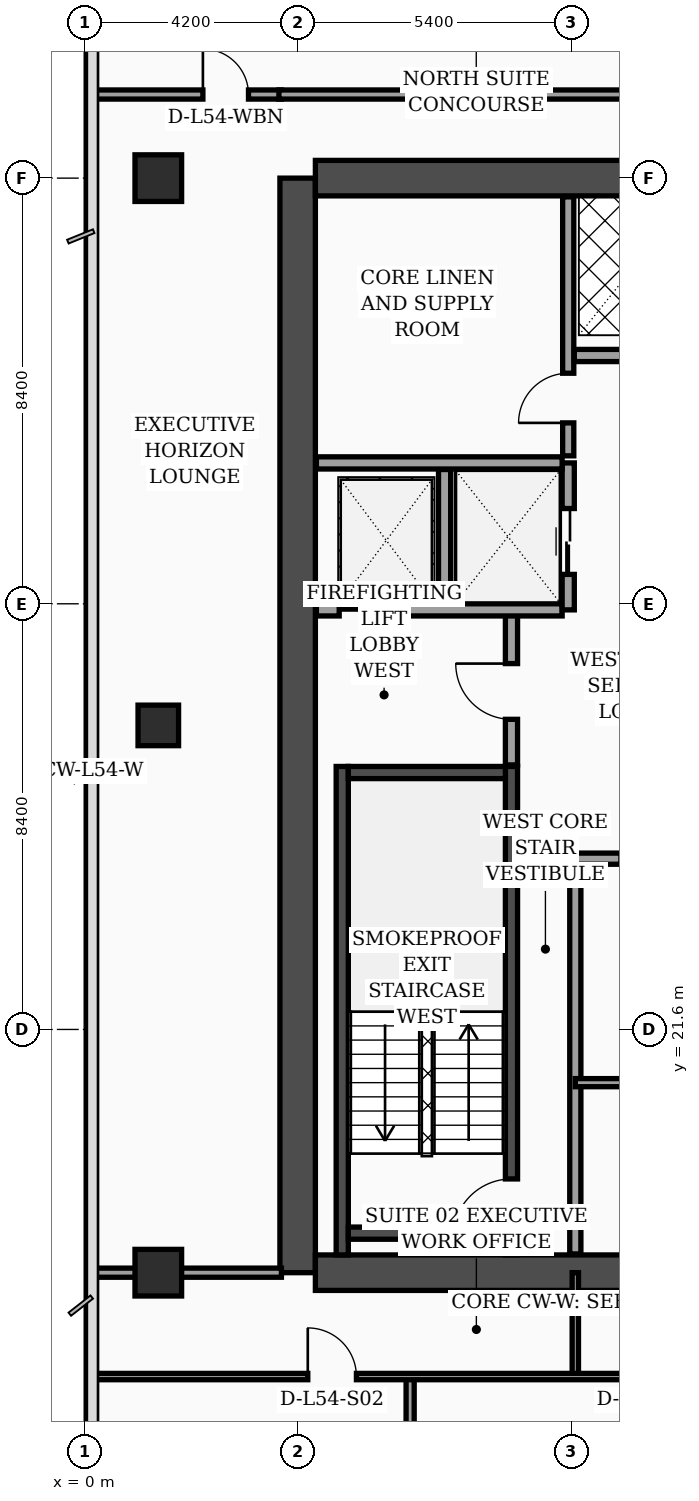
"""IFC4 building model, lengths in metres.
Left out: names, types, materials, properties, quantities, classifications, styles, units other than length and angle.
Written with IfcOpenShell. Run it as: python <this file> out.ifc"""

import sys

from ifc_helpers import new_model, si_unit, direction, frame, frame_2d, origin, origin_2d, place, context, subcontext, project, spatial, rectangle, extrude, element, fill, save


model = new_model("IFC4")
c1 = context("Model", 3, precision=1e-05, world=origin(), true_north=direction((0.0, 1.0)))
c2 = subcontext(c1, "Body", "Model", "MODEL_VIEW")
j1 = project(units=[si_unit("LENGTHUNIT", "METRE"), si_unit("PLANEANGLEUNIT", "RADIAN")], contexts=[c1])
p1 = place(None, origin())
s1 = spatial("IfcSite", under=j1, at=p1, CompositionType="ELEMENT")
p2 = place(p1, origin())
s2 = spatial("IfcBuilding", under=s1, at=p2, CompositionType="ELEMENT")
p3 = place(p2, frame((0.0, 0.0, 219.3)))
s3 = spatial("IfcBuildingStorey", under=s2, at=p3, CompositionType="ELEMENT", Elevation=219.3)
p4 = place(p3, frame((4.2, 16.8, 0.0), z_axis=(0.0, 0.0, 1.0), x_axis=(0.0, 1.0, 0.0)))
e1 = element("IfcWall", 1, at=p4, inside=s3, PredefinedType="SHEAR", context=c2, shape_type="SweptSolid", body=[
    extrude(rectangle(XDim=21.6, YDim=0.7, at=frame_2d((10.8, 0.0))), origin(), (0.0, 0.0, 1.0), 3.56),
])
for number, where, z_axis, x_axis in (
    (2, (4.55, 38.4, 0.0), (0.0, 0.0, 1.0), (1.0, 0.0, 0.0)),
    (3, (4.55, 16.8, 0.0), (0.0, 0.0, 1.0), (1.0, 0.0, 0.0)),
):
    element("IfcWall", number, at=place(p3, frame(where, z_axis=z_axis, x_axis=x_axis)), inside=s3, PredefinedType="SHEAR", context=c2, shape_type="SweptSolid", body=[
        extrude(rectangle(XDim=10.1, YDim=0.7, at=frame_2d((5.05, 0.0))), origin(), (0.0, 0.0, 1.0), 3.56),
    ])
p5 = place(p3, frame((5.08, 17.15, 0.0), z_axis=(0.0, 0.0, 1.0), x_axis=(0.0, 1.0, 0.0)))
e4 = element("IfcWall", 4, at=p5, inside=s3, PredefinedType="SOLIDWALL", context=c2, shape_type="SweptSolid", body=[
    extrude(rectangle(XDim=9.64, YDim=0.24, at=frame_2d((4.82, 0.0))), origin(), (0.0, 0.0, 1.0), 3.56),
])
p6 = place(p3, frame((8.42, 17.15, 0.0), z_axis=(0.0, 0.0, 1.0), x_axis=(0.0, 1.0, 0.0)))
e5 = element("IfcWall", 5, at=p6, inside=s3, PredefinedType="SOLIDWALL", context=c2, shape_type="SweptSolid", body=[
    extrude(rectangle(XDim=9.64, YDim=0.24, at=frame_2d((4.82, 0.0))), origin(), (0.0, 0.0, 1.0), 3.56),
])
p7 = place(p6, frame((0.35, 0.0, 0.0)))
e6 = element("IfcOpeningElement", 6, at=p7, cuts=e5, PredefinedType="OPENING", context=c2, shape_type="SweptSolid", body=[
    extrude(rectangle(XDim=1.15, YDim=2.2, at=frame_2d((0.575, 1.1))), frame((0.0, 0.13, 0.0), z_axis=(0.0, -1.0, 0.0), x_axis=(1.0, 0.0, 0.0)), (0.0, 0.0, 1.0), 0.26),
])
for number, where, z_axis, x_axis in (
    (7, (5.2, 17.58, 0.0), (0.0, 0.0, 1.0), (1.0, 0.0, 0.0)),
    (8, (5.2, 26.67, 0.0), (0.0, 0.0, 1.0), (1.0, 0.0, 0.0)),
):
    element("IfcWall", number, at=place(p3, frame(where, z_axis=z_axis, x_axis=x_axis)), inside=s3, PredefinedType="SOLIDWALL", context=c2, shape_type="SweptSolid", body=[
        extrude(rectangle(XDim=3.1, YDim=0.24, at=frame_2d((1.55, 0.0))), origin(), (0.0, 0.0, 1.0), 3.56),
    ])
p8 = place(p3, frame((1.45, 16.8, 0.0), z_axis=(0.0, 0.0, 1.0), x_axis=(1.0, 0.0, 0.0)))
e9 = element("IfcColumn", 9, at=p8, inside=s3, PredefinedType="COLUMN", context=c2, shape_type="SweptSolid", body=[
    extrude(rectangle(XDim=0.92, YDim=0.92, at=origin_2d()), origin(), (0.0, 0.0, 1.0), 3.56),
])
p9 = place(p3, frame((1.45, 27.6, 0.0), z_axis=(0.0, 0.0, 1.0), x_axis=(1.0, 0.0, 0.0)))
e10 = element("IfcColumn", 10, at=p9, inside=s3, PredefinedType="COLUMN", context=c2, shape_type="SweptSolid", body=[
    extrude(rectangle(XDim=0.8, YDim=0.8, at=origin_2d()), origin(), (0.0, 0.0, 1.0), 3.56),
])
p10 = place(p3, frame((1.45, 38.4, 0.0), z_axis=(0.0, 0.0, 1.0), x_axis=(1.0, 0.0, 0.0)))
e11 = element("IfcColumn", 11, at=p10, inside=s3, PredefinedType="COLUMN", context=c2, shape_type="SweptSolid", body=[
    extrude(rectangle(XDim=0.92, YDim=0.92, at=origin_2d()), origin(), (0.0, 0.0, 1.0), 3.56),
])
p11 = place(p3, frame((8.42, 26.82, 0.0), z_axis=(0.0, 0.0, 1.0), x_axis=(0.0, 1.0, 0.0)))
e12 = element("IfcWall", 12, at=p11, inside=s3, PredefinedType="SOLIDWALL", context=c2, shape_type="SweptSolid", body=[
    extrude(rectangle(XDim=3.0, YDim=0.24, at=frame_2d((1.5, 0.0))), origin(), (0.0, 0.0, 1.0), 3.56),
])
p12 = place(p11, frame((0.9, 0.0, 0.0)))
e13 = element("IfcOpeningElement", 13, at=p12, cuts=e12, PredefinedType="OPENING", context=c2, shape_type="SweptSolid", body=[
    extrude(rectangle(XDim=1.1, YDim=2.2, at=frame_2d((0.55, 1.1))), frame((0.0, 0.13, 0.0), z_axis=(0.0, -1.0, 0.0), x_axis=(1.0, 0.0, 0.0)), (0.0, 0.0, 1.0), 0.26),
])
p13 = place(p3, frame((4.57, 29.88, 0.0), z_axis=(0.0, 0.0, 1.0), x_axis=(1.0, 0.0, 0.0)))
e14 = element("IfcWall", 14, at=p13, inside=s3, PredefinedType="SOLIDWALL", context=c2, shape_type="SweptSolid", body=[
    extrude(rectangle(XDim=4.85, YDim=0.24, at=frame_2d((2.425, 0.0))), origin(), (0.0, 0.0, 1.0), 3.56),
])
p14 = place(p13, frame((0.45, 0.0, 0.0)))
e15 = element("IfcOpeningElement", 15, at=p14, cuts=e14, PredefinedType="OPENING", context=c2, shape_type="SweptSolid", body=[
    extrude(rectangle(XDim=1.3, YDim=2.35, at=frame_2d((0.65, 1.175))), frame((0.0, 0.13, 0.0), z_axis=(0.0, -1.0, 0.0), x_axis=(1.0, 0.0, 0.0)), (0.0, 0.0, 1.0), 0.26),
])
p15 = place(p3, frame((7.1, 30.02, 0.0), z_axis=(0.0, 0.0, 1.0), x_axis=(0.0, 1.0, 0.0)))
e16 = element("IfcWall", 16, at=p15, inside=s3, PredefinedType="SOLIDWALL", context=c2, shape_type="SweptSolid", body=[
    extrude(rectangle(XDim=2.63, YDim=0.24, at=frame_2d((1.315, 0.0))), origin(), (0.0, 0.0, 1.0), 3.56),
])
p16 = place(p3, frame((9.54, 29.88, 0.0), z_axis=(0.0, 0.0, 1.0), x_axis=(0.0, 1.0, 0.0)))
e17 = element("IfcWall", 17, at=p16, inside=s3, PredefinedType="SOLIDWALL", context=c2, shape_type="SweptSolid", body=[
    extrude(rectangle(XDim=2.9, YDim=0.24, at=frame_2d((1.45, 0.0))), origin(), (0.0, 0.0, 1.0), 3.56),
])
p17 = place(p16, frame((0.7, 0.0, 0.0)))
e18 = element("IfcOpeningElement", 18, at=p17, cuts=e17, PredefinedType="OPENING", context=c2, shape_type="SweptSolid", body=[
    extrude(rectangle(XDim=1.3, YDim=2.35, at=frame_2d((0.65, 1.175))), frame((0.0, 0.13, 0.0), z_axis=(0.0, -1.0, 0.0), x_axis=(1.0, 0.0, 0.0)), (0.0, 0.0, 1.0), 0.26),
])
p18 = place(p3, frame((4.57, 32.78, 0.0), z_axis=(0.0, 0.0, 1.0), x_axis=(1.0, 0.0, 0.0)))
e19 = element("IfcWall", 19, at=p18, inside=s3, PredefinedType="SOLIDWALL", context=c2, shape_type="SweptSolid", body=[
    extrude(rectangle(XDim=4.85, YDim=0.24, at=frame_2d((2.425, 0.0))), origin(), (0.0, 0.0, 1.0), 3.19),
])
p19 = place(p3, frame((9.68, 17.17, 0.0), z_axis=(0.0, 0.0, 1.0), x_axis=(0.0, 1.0, 0.0)))
e20 = element("IfcWall", 20, at=p19, inside=s3, PredefinedType="SOLIDWALL", context=c2, shape_type="SweptSolid", body=[
    extrude(rectangle(XDim=7.83, YDim=0.22, at=frame_2d((3.915, 0.0))), origin(), (0.0, 0.0, 1.0), 3.56),
])
p20 = place(p3, frame((9.54, 32.92, 0.0), z_axis=(0.0, 0.0, 1.0), x_axis=(0.0, 1.0, 0.0)))
e21 = element("IfcWall", 21, at=p20, inside=s3, PredefinedType="SOLIDWALL", context=c2, shape_type="SweptSolid", body=[
    extrude(rectangle(XDim=5.11, YDim=0.22, at=frame_2d((2.555, 0.0))), origin(), (0.0, 0.0, 1.0), 3.56),
])
p21 = place(p20, frame((0.65, 0.0, 0.0)))
e22 = element("IfcOpeningElement", 22, at=p21, cuts=e21, PredefinedType="OPENING", context=c2, shape_type="SweptSolid", body=[
    extrude(rectangle(XDim=0.98, YDim=2.15, at=frame_2d((0.49, 1.075))), frame((0.0, 0.12, 0.0), z_axis=(0.0, -1.0, 0.0), x_axis=(1.0, 0.0, 0.0)), (0.0, 0.0, 1.0), 0.24),
])
p22 = place(p3, frame((9.68, 20.55, 0.0), z_axis=(0.0, 0.0, 1.0), x_axis=(1.0, 0.0, 0.0)))
e23 = element("IfcWall", 23, at=p22, inside=s3, PredefinedType="PARTITIONING", context=c2, shape_type="SweptSolid", body=[
    extrude(rectangle(XDim=4.95, YDim=0.16, at=frame_2d((2.475, 0.0))), origin(), (0.0, 0.0, 1.0), 3.56),
])
p23 = place(p22, frame((1.1, 0.0, 0.0)))
e24 = element("IfcOpeningElement", 24, at=p23, cuts=e23, PredefinedType="OPENING", context=c2, shape_type="SweptSolid", body=[
    extrude(rectangle(XDim=0.98, YDim=2.15, at=frame_2d((0.49, 1.075))), frame((0.0, 0.09, 0.0), z_axis=(0.0, -1.0, 0.0), x_axis=(1.0, 0.0, 0.0)), (0.0, 0.0, 1.0), 0.18),
])
p24 = place(p3, frame((9.68, 24.97, 0.0), z_axis=(0.0, 0.0, 1.0), x_axis=(1.0, 0.0, 0.0)))
e25 = element("IfcWall", 25, at=p24, inside=s3, PredefinedType="SOLIDWALL", context=c2, shape_type="SweptSolid", body=[
    extrude(rectangle(XDim=4.95, YDim=0.22, at=frame_2d((2.475, 0.0))), origin(), (0.0, 0.0, 1.0), 2.94),
])
p25 = place(p24, frame((0.9, 0.0, 0.0)))
e26 = element("IfcOpeningElement", 26, at=p25, cuts=e25, PredefinedType="OPENING", context=c2, shape_type="SweptSolid", body=[
    extrude(rectangle(XDim=0.98, YDim=2.15, at=frame_2d((0.49, 1.075))), frame((0.0, 0.12, 0.0), z_axis=(0.0, -1.0, 0.0), x_axis=(1.0, 0.0, 0.0)), (0.0, 0.0, 1.0), 0.24),
])
p26 = place(p3, frame((9.66, 34.9, 0.0), z_axis=(0.0, 0.0, 1.0), x_axis=(1.0, 0.0, 0.0)))
e27 = element("IfcWall", 27, at=p26, inside=s3, PredefinedType="SOLIDWALL", context=c2, shape_type="SweptSolid", body=[
    extrude(rectangle(XDim=4.97, YDim=0.24, at=frame_2d((2.485, 0.0))), origin(), (0.0, 0.0, 1.0), 3.56),
])
p27 = place(p3, frame((0.08, 16.8, 0.0), z_axis=(0.0, 0.0, 1.0), x_axis=(1.0, 0.0, 0.0)))
e28 = element("IfcWall", 28, at=p27, inside=s3, PredefinedType="PARTITIONING", context=c2, shape_type="SweptSolid", body=[
    extrude(rectangle(XDim=3.8, YDim=0.18, at=frame_2d((1.9, 0.0))), origin(), (0.0, 0.0, 1.0), 2.94),
])
p28 = place(p3, frame((0.08, 40.05, 0.0), z_axis=(0.0, 0.0, 1.0), x_axis=(1.0, 0.0, 0.0)))
e29 = element("IfcWall", 29, at=p28, inside=s3, PredefinedType="PARTITIONING", context=c2, shape_type="SweptSolid", body=[
    extrude(rectangle(XDim=3.8, YDim=0.18, at=frame_2d((1.9, 0.0))), origin(), (0.0, 0.0, 1.0), 2.94),
])
p29 = place(p28, frame((2.25, 0.0, 0.0)))
e30 = element("IfcOpeningElement", 30, at=p29, cuts=e29, PredefinedType="OPENING", context=c2, shape_type="SweptSolid", body=[
    extrude(rectangle(XDim=0.9, YDim=2.15, at=frame_2d((0.45, 1.075))), frame((0.0, 0.1, 0.0), z_axis=(0.0, -1.0, 0.0), x_axis=(1.0, 0.0, 0.0)), (0.0, 0.0, 1.0), 0.2),
])
p30 = place(p3, frame((9.68, 14.75, 0.0), z_axis=(0.0, 0.0, 1.0), x_axis=(0.0, 1.0, 0.0)))
e31 = element("IfcWall", 31, at=p30, inside=s3, PredefinedType="PARTITIONING", context=c2, shape_type="SweptSolid", body=[
    extrude(rectangle(XDim=2.05, YDim=0.125, at=frame_2d((1.025, 0.0))), origin(), (0.0, 0.0, 1.0), 3.56),
])
p31 = place(p3, frame((6.42, 9.5, 0.0), z_axis=(0.0, 0.0, 1.0), x_axis=(0.0, 1.0, 0.0)))
e32 = element("IfcWall", 32, at=p31, inside=s3, PredefinedType="PARTITIONING", context=c2, shape_type="SweptSolid", body=[
    extrude(rectangle(XDim=5.25, YDim=0.16, at=frame_2d((2.625, 0.0))), origin(), (0.0, 0.0, 1.0), 3.14),
])
p32 = place(p31, frame((2.15, 0.0, 0.0)))
e33 = element("IfcOpeningElement", 33, at=p32, cuts=e32, PredefinedType="OPENING", context=c2, shape_type="SweptSolid", body=[
    extrude(rectangle(XDim=0.96, YDim=2.2, at=frame_2d((0.48, 1.1))), frame((0.0, 0.09, 0.0), z_axis=(0.0, -1.0, 0.0), x_axis=(1.0, 0.0, 0.0)), (0.0, 0.0, 1.0), 0.18),
])
p33 = place(p3, frame((0.08, 14.75, 0.0), z_axis=(0.0, 0.0, 1.0), x_axis=(1.0, 0.0, 0.0)))
e34 = element("IfcWall", 34, at=p33, inside=s3, PredefinedType="PARTITIONING", context=c2, shape_type="SweptSolid", body=[
    extrude(rectangle(XDim=12.52, YDim=0.125, at=frame_2d((6.26, 0.0))), origin(), (0.0, 0.0, 1.0), 2.94),
])
p34 = place(p33, frame((4.32, 0.0, 0.0)))
e35 = element("IfcOpeningElement", 35, at=p34, cuts=e34, PredefinedType="OPENING", context=c2, shape_type="SweptSolid", body=[
    extrude(rectangle(XDim=0.96, YDim=2.2, at=frame_2d((0.48, 1.1))), frame((0.0, 0.073, 0.0), z_axis=(0.0, -1.0, 0.0), x_axis=(1.0, 0.0, 0.0)), (0.0, 0.0, 1.0), 0.145),
])
p35 = place(p33, frame((10.61, 0.0, 0.0)))
e36 = element("IfcOpeningElement", 36, at=p35, cuts=e34, PredefinedType="OPENING", context=c2, shape_type="SweptSolid", body=[
    extrude(rectangle(XDim=0.9, YDim=2.15, at=frame_2d((0.45, 1.075))), frame((0.0, 0.073, 0.0), z_axis=(0.0, -1.0, 0.0), x_axis=(1.0, 0.0, 0.0)), (0.0, 0.0, 1.0), 0.145),
])
p36 = place(p3, frame((3.83, 40.05, 0.0), z_axis=(0.0, 0.0, 1.0), x_axis=(1.0, 0.0, 0.0)))
e37 = element("IfcWall", 37, at=p36, inside=s3, PredefinedType="PARTITIONING", context=c2, shape_type="SweptSolid", body=[
    extrude(rectangle(XDim=11.32, YDim=0.18, at=frame_2d((5.66, 0.0))), origin(), (0.0, 0.0, 1.0), 2.94),
])
p37 = place(p12, origin())
e38 = element("IfcDoor", 38, at=p37, inside=s3, OperationType="SINGLE_SWING_RIGHT", PredefinedType="DOOR", context=c2, shape_type="SweptSolid", body=[
    extrude(rectangle(XDim=1.1, YDim=2.2, at=frame_2d((0.55, 1.1))), frame((0.0, 0.025, 0.0), z_axis=(0.0, -1.0, 0.0), x_axis=(1.0, 0.0, 0.0)), (0.0, 0.0, 1.0), 0.05),
])
fill(e13, e38)
p38 = place(p14, origin())
e39 = element("IfcDoor", 39, at=p38, inside=s3, OperationType="DOUBLE_DOOR_SLIDING", PredefinedType="DOOR", context=c2, shape_type="SweptSolid", body=[
    extrude(rectangle(XDim=1.3, YDim=2.35, at=frame_2d((0.65, 1.175))), frame((0.0, 0.025, 0.0), z_axis=(0.0, -1.0, 0.0), x_axis=(1.0, 0.0, 0.0)), (0.0, 0.0, 1.0), 0.05),
])
fill(e15, e39)
p39 = place(p17, origin())
e40 = element("IfcDoor", 40, at=p39, inside=s3, OperationType="DOUBLE_DOOR_SLIDING", PredefinedType="DOOR", context=c2, shape_type="SweptSolid", body=[
    extrude(rectangle(XDim=1.3, YDim=2.35, at=frame_2d((0.65, 1.175))), frame((0.0, 0.025, 0.0), z_axis=(0.0, -1.0, 0.0), x_axis=(1.0, 0.0, 0.0)), (0.0, 0.0, 1.0), 0.05),
])
fill(e18, e40)
p40 = place(p21, origin())
e41 = element("IfcDoor", 41, at=p40, inside=s3, OperationType="SINGLE_SWING_LEFT", PredefinedType="DOOR", context=c2, shape_type="SweptSolid", body=[
    extrude(rectangle(XDim=0.98, YDim=2.15, at=frame_2d((0.49, 1.075))), frame((0.0, 0.025, 0.0), z_axis=(0.0, -1.0, 0.0), x_axis=(1.0, 0.0, 0.0)), (0.0, 0.0, 1.0), 0.05),
])
fill(e22, e41)
p41 = place(p29, origin())
e42 = element("IfcDoor", 42, at=p41, inside=s3, OperationType="SINGLE_SWING_LEFT", PredefinedType="DOOR", context=c2, shape_type="SweptSolid", body=[
    extrude(rectangle(XDim=0.9, YDim=2.15, at=frame_2d((0.45, 1.075))), frame((0.0, 0.025, 0.0), z_axis=(0.0, -1.0, 0.0), x_axis=(1.0, 0.0, 0.0)), (0.0, 0.0, 1.0), 0.05),
])
fill(e30, e42)
p42 = place(p34, origin())
e43 = element("IfcDoor", 43, at=p42, inside=s3, OperationType="SINGLE_SWING_LEFT", PredefinedType="DOOR", context=c2, shape_type="SweptSolid", body=[
    extrude(rectangle(XDim=0.96, YDim=2.2, at=frame_2d((0.48, 1.1))), frame((0.0, 0.025, 0.0), z_axis=(0.0, -1.0, 0.0), x_axis=(1.0, 0.0, 0.0)), (0.0, 0.0, 1.0), 0.05),
])
fill(e35, e43)
p43 = place(p7, origin())
e44 = element("IfcDoor", 44, at=p43, inside=s3, OperationType="SINGLE_SWING_LEFT", PredefinedType="DOOR", context=c2, shape_type="SweptSolid", body=[
    extrude(rectangle(XDim=1.15, YDim=2.2, at=frame_2d((0.575, 1.1))), frame((0.0, 0.025, 0.0), z_axis=(0.0, -1.0, 0.0), x_axis=(1.0, 0.0, 0.0)), (0.0, 0.0, 1.0), 0.05),
])
fill(e6, e44)
save(model, sys.argv[1])
